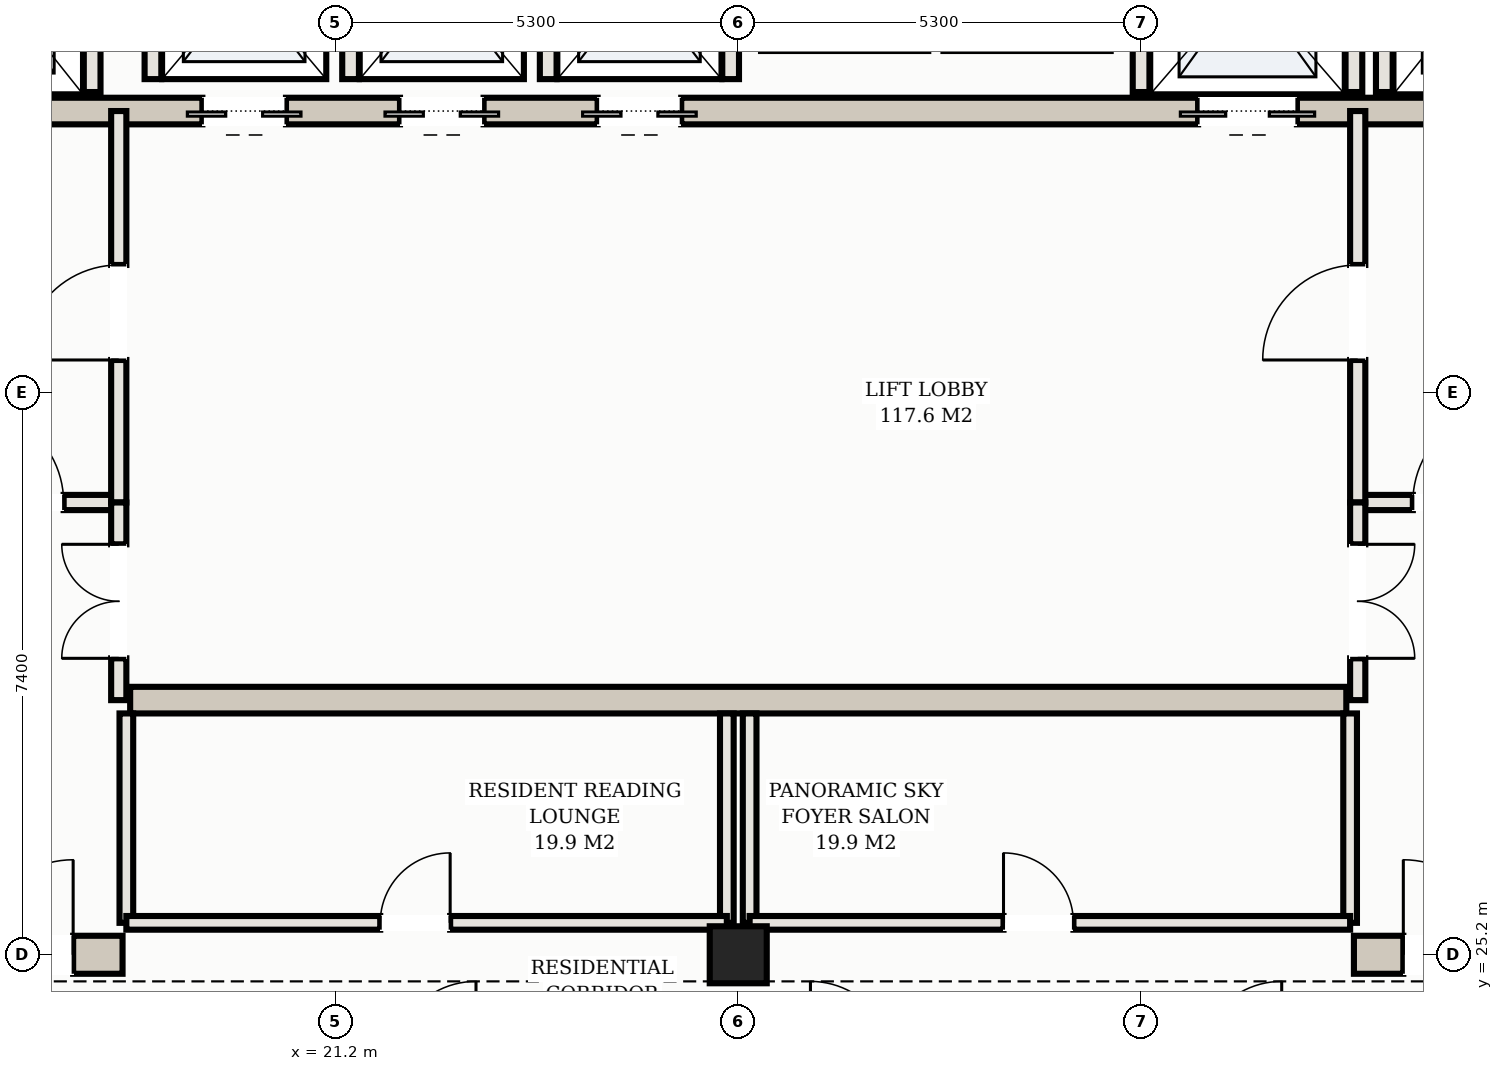
"""IFC4 building model, lengths in metres.
Left out: names, types, materials, properties, quantities, classifications, styles, units other than length and angle.
Written with IfcOpenShell. Run it as: python <this file> out.ifc"""

import sys

from ifc_helpers import new_model, si_unit, direction, frame, frame_2d, origin, origin_2d, place, context, subcontext, project, spatial, rectangle, hollow_rectangle, extrude, element, fill, save


model = new_model("IFC4")
c1 = context("Model", 3, precision=1e-05, world=origin(), true_north=direction((0.0, 1.0)))
c2 = subcontext(c1, "Body", "Model", "MODEL_VIEW")
j1 = project(units=[si_unit("LENGTHUNIT", "METRE"), si_unit("PLANEANGLEUNIT", "RADIAN")], contexts=[c1])
p1 = place(None, origin())
s1 = spatial("IfcSite", under=j1, at=p1, CompositionType="ELEMENT")
p2 = place(p1, origin())
s2 = spatial("IfcBuilding", under=s1, at=p2, CompositionType="ELEMENT")
p3 = place(p2, frame((0.0, 0.0, 236.3)))
s3 = spatial("IfcBuildingStorey", under=s2, at=p3, CompositionType="ELEMENT", Elevation=236.3)
p4 = place(p3, frame((10.35, 25.2, 0.0), z_axis=(0.0, 0.0, 1.0), x_axis=(1.0, 0.0, 0.0)))
e1 = element("IfcWall", 1, at=p4, inside=s3, PredefinedType="SHEAR", context=c2, shape_type="SweptSolid", body=[
    extrude(rectangle(XDim=8.05, YDim=0.5, at=frame_2d((4.025, 0.0))), origin(), (0.0, 0.0, 1.0), 3.11),
])
p5 = place(p4, frame((6.15, 0.0, 0.0)))
e2 = element("IfcOpeningElement", 2, at=p5, cuts=e1, PredefinedType="OPENING", context=c2, shape_type="SweptSolid", body=[
    extrude(rectangle(XDim=1.25, YDim=2.2, at=frame_2d((0.625, 1.1))), frame((0.0, 0.26, 0.0), z_axis=(0.0, -1.0, 0.0), x_axis=(1.0, 0.0, 0.0)), (0.0, 0.0, 1.0), 0.52),
])
p6 = place(p3, frame((34.6, 25.2, 0.0), z_axis=(0.0, 0.0, 1.0), x_axis=(1.0, 0.0, 0.0)))
e3 = element("IfcWall", 3, at=p6, inside=s3, PredefinedType="SHEAR", context=c2, shape_type="SweptSolid", body=[
    extrude(rectangle(XDim=8.05, YDim=0.5, at=frame_2d((4.025, 0.0))), origin(), (0.0, 0.0, 1.0), 3.11),
])
p7 = place(p6, frame((0.65, 0.0, 0.0)))
e4 = element("IfcOpeningElement", 4, at=p7, cuts=e3, PredefinedType="OPENING", context=c2, shape_type="SweptSolid", body=[
    extrude(rectangle(XDim=1.25, YDim=2.2, at=frame_2d((0.625, 1.1))), frame((0.0, 0.26, 0.0), z_axis=(0.0, -1.0, 0.0), x_axis=(1.0, 0.0, 0.0)), (0.0, 0.0, 1.0), 0.52),
])
p8 = place(p3, frame((15.5, 36.3, 0.0), z_axis=(0.0, 0.0, 1.0), x_axis=(1.0, 0.0, 0.0)))
e5 = element("IfcWall", 5, at=p8, inside=s3, PredefinedType="SHEAR", context=c2, shape_type="SweptSolid", body=[
    extrude(rectangle(XDim=22.0, YDim=0.35, at=frame_2d((11.0, 0.0))), origin(), (0.0, 0.0, 1.0), 3.11),
])
p9 = place(p8, frame((0.65, 0.0, 0.0)))
e6 = element("IfcOpeningElement", 6, at=p9, cuts=e5, PredefinedType="OPENING", context=c2, shape_type="SweptSolid", body=[
    extrude(rectangle(XDim=1.1, YDim=2.15, at=frame_2d((0.55, 1.075))), frame((0.0, 0.185, 0.0), z_axis=(0.0, -1.0, 0.0), x_axis=(1.0, 0.0, 0.0)), (0.0, 0.0, 1.0), 0.37),
])
p10 = place(p8, frame((20.25, 0.0, 0.0)))
e7 = element("IfcOpeningElement", 7, at=p10, cuts=e5, PredefinedType="OPENING", context=c2, shape_type="SweptSolid", body=[
    extrude(rectangle(XDim=1.1, YDim=2.15, at=frame_2d((0.55, 1.075))), frame((0.0, 0.185, 0.0), z_axis=(0.0, -1.0, 0.0), x_axis=(1.0, 0.0, 0.0)), (0.0, 0.0, 1.0), 0.37),
])
p11 = place(p8, frame((17.05, 0.0, 0.0)))
e8 = element("IfcOpeningElement", 8, at=p11, cuts=e5, PredefinedType="OPENING", context=c2, shape_type="SweptSolid", body=[
    extrude(rectangle(XDim=1.3, YDim=2.2, at=frame_2d((0.65, 1.1))), frame((0.0, 0.185, 0.0), z_axis=(0.0, -1.0, 0.0), x_axis=(1.0, 0.0, 0.0)), (0.0, 0.0, 1.0), 0.37),
])
p12 = place(p8, frame((3.95, 0.0, 0.0)))
e9 = element("IfcOpeningElement", 9, at=p12, cuts=e5, PredefinedType="OPENING", context=c2, shape_type="SweptSolid", body=[
    extrude(rectangle(XDim=1.1, YDim=2.15, at=frame_2d((0.55, 1.075))), frame((0.0, 0.185, 0.0), z_axis=(0.0, -1.0, 0.0), x_axis=(1.0, 0.0, 0.0)), (0.0, 0.0, 1.0), 0.37),
])
p13 = place(p8, frame((6.55, 0.0, 0.0)))
e10 = element("IfcOpeningElement", 10, at=p13, cuts=e5, PredefinedType="OPENING", context=c2, shape_type="SweptSolid", body=[
    extrude(rectangle(XDim=1.1, YDim=2.15, at=frame_2d((0.55, 1.075))), frame((0.0, 0.185, 0.0), z_axis=(0.0, -1.0, 0.0), x_axis=(1.0, 0.0, 0.0)), (0.0, 0.0, 1.0), 0.37),
])
p14 = place(p8, frame((9.15, 0.0, 0.0)))
e11 = element("IfcOpeningElement", 11, at=p14, cuts=e5, PredefinedType="OPENING", context=c2, shape_type="SweptSolid", body=[
    extrude(rectangle(XDim=1.1, YDim=2.15, at=frame_2d((0.55, 1.075))), frame((0.0, 0.185, 0.0), z_axis=(0.0, -1.0, 0.0), x_axis=(1.0, 0.0, 0.0)), (0.0, 0.0, 1.0), 0.37),
])
p15 = place(p3, frame((18.5, 28.55, 0.0), z_axis=(0.0, 0.0, 1.0), x_axis=(1.0, 0.0, 0.0)))
e12 = element("IfcWall", 12, at=p15, inside=s3, PredefinedType="SHEAR", context=c2, shape_type="SweptSolid", body=[
    extrude(rectangle(XDim=16.0, YDim=0.35, at=frame_2d((8.0, 0.0))), origin(), (0.0, 0.0, 1.0), 3.11),
])
p16 = place(p3, frame((26.5, 25.2, 0.0), z_axis=(0.0, 0.0, 1.0), x_axis=(1.0, 0.0, 0.0)))
e13 = element("IfcColumn", 13, at=p16, inside=s3, PredefinedType="COLUMN", context=c2, shape_type="SweptSolid", body=[
    extrude(hollow_rectangle(XDim=0.75, YDim=0.75, WallThickness=0.025, at=origin_2d()), origin(), (0.0, 0.0, 1.0), 3.3),
])
for number, where, z_axis, x_axis in (
    (14, (18.0, 36.55, 0.0), (0.0, 0.0, 1.0), (0.0, 1.0, 0.0)),
    (15, (35.0, 36.55, 0.0), (0.0, 0.0, 1.0), (0.0, 1.0, 0.0)),
    (16, (31.8, 36.55, 0.0), (0.0, 0.0, 1.0), (0.0, 1.0, 0.0)),
    (17, (34.6, 36.55, 0.0), (0.0, 0.0, 1.0), (0.0, 1.0, 0.0)),
):
    element("IfcWall", number, at=place(p3, frame(where, z_axis=z_axis, x_axis=x_axis)), inside=s3, PredefinedType="SOLIDWALL", context=c2, shape_type="SweptSolid", body=[
        extrude(rectangle(XDim=2.93, YDim=0.22, at=frame_2d((1.465, 0.0))), origin(), (0.0, 0.0, 1.0), 3.11),
    ])
for number, where, z_axis, x_axis in (
    (18, (18.8, 36.72, 0.0), (0.0, 0.0, 1.0), (0.0, 1.0, 0.0)),
    (19, (21.4, 36.72, 0.0), (0.0, 0.0, 1.0), (0.0, 1.0, 0.0)),
    (20, (24.0, 36.72, 0.0), (0.0, 0.0, 1.0), (0.0, 1.0, 0.0)),
    (21, (26.4, 36.72, 0.0), (0.0, 0.0, 1.0), (0.0, 1.0, 0.0)),
):
    element("IfcWall", number, at=place(p3, frame(where, z_axis=z_axis, x_axis=x_axis)), inside=s3, PredefinedType="SOLIDWALL", context=c2, shape_type="SweptSolid", body=[
        extrude(rectangle(XDim=2.56, YDim=0.22, at=frame_2d((1.28, 0.0))), origin(), (0.0, 0.0, 1.0), 3.11),
    ])
p17 = place(p3, frame((15.1, 31.15, 0.0), z_axis=(0.0, 0.0, 1.0), x_axis=(1.0, 0.0, 0.0)))
e22 = element("IfcWall", 22, at=p17, inside=s3, PredefinedType="PARTITIONING", context=c2, shape_type="SweptSolid", body=[
    extrude(rectangle(XDim=3.25, YDim=0.2, at=frame_2d((1.625, 0.0))), origin(), (0.0, 0.0, 1.0), 2.45),
])
p18 = place(p17, frame((1.275, 0.0, 0.0)))
e23 = element("IfcOpeningElement", 23, at=p18, cuts=e22, PredefinedType="OPENING", context=c2, shape_type="SweptSolid", body=[
    extrude(rectangle(XDim=1.25, YDim=2.2, at=frame_2d((0.625, 1.1))), frame((0.0, 0.11, 0.0), z_axis=(0.0, -1.0, 0.0), x_axis=(1.0, 0.0, 0.0)), (0.0, 0.0, 1.0), 0.22),
])
p19 = place(p3, frame((18.35, 31.15, 0.0), z_axis=(0.0, 0.0, 1.0), x_axis=(0.0, 1.0, 0.0)))
e24 = element("IfcWall", 24, at=p19, inside=s3, PredefinedType="PARTITIONING", context=c2, shape_type="SweptSolid", body=[
    extrude(rectangle(XDim=5.15, YDim=0.2, at=frame_2d((2.575, 0.0))), origin(), (0.0, 0.0, 1.0), 2.45),
])
p20 = place(p19, frame((1.875, 0.0, 0.0)))
e25 = element("IfcOpeningElement", 25, at=p20, cuts=e24, PredefinedType="OPENING", context=c2, shape_type="SweptSolid", body=[
    extrude(rectangle(XDim=1.25, YDim=2.2, at=frame_2d((0.625, 1.1))), frame((0.0, 0.11, 0.0), z_axis=(0.0, -1.0, 0.0), x_axis=(1.0, 0.0, 0.0)), (0.0, 0.0, 1.0), 0.22),
])
p21 = place(p3, frame((34.65, 31.15, 0.0), z_axis=(0.0, 0.0, 1.0), x_axis=(1.0, 0.0, 0.0)))
e26 = element("IfcWall", 26, at=p21, inside=s3, PredefinedType="PARTITIONING", context=c2, shape_type="SweptSolid", body=[
    extrude(rectangle(XDim=3.25, YDim=0.2, at=frame_2d((1.625, 0.0))), origin(), (0.0, 0.0, 1.0), 2.45),
])
p22 = place(p21, frame((0.725, 0.0, 0.0)))
e27 = element("IfcOpeningElement", 27, at=p22, cuts=e26, PredefinedType="OPENING", context=c2, shape_type="SweptSolid", body=[
    extrude(rectangle(XDim=1.25, YDim=2.2, at=frame_2d((0.625, 1.1))), frame((0.0, 0.11, 0.0), z_axis=(0.0, -1.0, 0.0), x_axis=(1.0, 0.0, 0.0)), (0.0, 0.0, 1.0), 0.22),
])
p23 = place(p3, frame((34.65, 31.15, 0.0), z_axis=(0.0, 0.0, 1.0), x_axis=(0.0, 1.0, 0.0)))
e28 = element("IfcWall", 28, at=p23, inside=s3, PredefinedType="PARTITIONING", context=c2, shape_type="SweptSolid", body=[
    extrude(rectangle(XDim=5.15, YDim=0.2, at=frame_2d((2.575, 0.0))), origin(), (0.0, 0.0, 1.0), 2.45),
])
p24 = place(p23, frame((1.875, 0.0, 0.0)))
e29 = element("IfcOpeningElement", 29, at=p24, cuts=e28, PredefinedType="OPENING", context=c2, shape_type="SweptSolid", body=[
    extrude(rectangle(XDim=1.25, YDim=2.2, at=frame_2d((0.625, 1.1))), frame((0.0, 0.11, 0.0), z_axis=(0.0, -1.0, 0.0), x_axis=(1.0, 0.0, 0.0)), (0.0, 0.0, 1.0), 0.22),
])
p25 = place(p3, frame((18.35, 28.55, 0.0), z_axis=(0.0, 0.0, 1.0), x_axis=(0.0, 1.0, 0.0)))
e30 = element("IfcWall", 30, at=p25, inside=s3, PredefinedType="PARTITIONING", context=c2, shape_type="SweptSolid", body=[
    extrude(rectangle(XDim=2.6, YDim=0.2, at=frame_2d((1.3, 0.0))), origin(), (0.0, 0.0, 1.0), 2.45),
])
p26 = place(p25, frame((0.55, 0.0, 0.0)))
e31 = element("IfcOpeningElement", 31, at=p26, cuts=e30, PredefinedType="OPENING", context=c2, shape_type="SweptSolid", body=[
    extrude(rectangle(XDim=1.5, YDim=2.25, at=frame_2d((0.75, 1.125))), frame((0.0, 0.11, 0.0), z_axis=(0.0, -1.0, 0.0), x_axis=(1.0, 0.0, 0.0)), (0.0, 0.0, 1.0), 0.22),
])
p27 = place(p3, frame((34.65, 28.55, 0.0), z_axis=(0.0, 0.0, 1.0), x_axis=(0.0, 1.0, 0.0)))
e32 = element("IfcWall", 32, at=p27, inside=s3, PredefinedType="PARTITIONING", context=c2, shape_type="SweptSolid", body=[
    extrude(rectangle(XDim=2.6, YDim=0.2, at=frame_2d((1.3, 0.0))), origin(), (0.0, 0.0, 1.0), 2.45),
])
p28 = place(p27, frame((0.55, 0.0, 0.0)))
e33 = element("IfcOpeningElement", 33, at=p28, cuts=e32, PredefinedType="OPENING", context=c2, shape_type="SweptSolid", body=[
    extrude(rectangle(XDim=1.5, YDim=2.25, at=frame_2d((0.75, 1.125))), frame((0.0, 0.11, 0.0), z_axis=(0.0, -1.0, 0.0), x_axis=(1.0, 0.0, 0.0)), (0.0, 0.0, 1.0), 0.22),
])
for number, where, z_axis, x_axis in (
    (34, (18.45, 25.62, 0.0), (0.0, 0.0, 1.0), (0.0, 1.0, 0.0)),
    (35, (26.35, 25.62, 0.0), (0.0, 0.0, 1.0), (0.0, 1.0, 0.0)),
):
    element("IfcWall", number, at=place(p3, frame(where, z_axis=z_axis, x_axis=x_axis)), inside=s3, PredefinedType="PARTITIONING", context=c2, shape_type="SweptSolid", body=[
        extrude(rectangle(XDim=2.755, YDim=0.18, at=frame_2d((1.377, 0.0))), origin(), (0.0, 0.0, 1.0), 2.45),
    ])
p29 = place(p3, frame((18.45, 25.62, 0.0), z_axis=(0.0, 0.0, 1.0), x_axis=(1.0, 0.0, 0.0)))
e36 = element("IfcWall", 36, at=p29, inside=s3, PredefinedType="PARTITIONING", context=c2, shape_type="SweptSolid", body=[
    extrude(rectangle(XDim=7.9, YDim=0.18, at=frame_2d((3.95, 0.0))), origin(), (0.0, 0.0, 1.0), 2.45),
])
p30 = place(p29, frame((3.34, 0.0, 0.0)))
e37 = element("IfcOpeningElement", 37, at=p30, cuts=e36, PredefinedType="OPENING", context=c2, shape_type="SweptSolid", body=[
    extrude(rectangle(XDim=0.92, YDim=2.15, at=frame_2d((0.46, 1.075))), frame((0.0, 0.1, 0.0), z_axis=(0.0, -1.0, 0.0), x_axis=(1.0, 0.0, 0.0)), (0.0, 0.0, 1.0), 0.2),
])
for number, where, z_axis, x_axis in (
    (38, (26.65, 25.62, 0.0), (0.0, 0.0, 1.0), (0.0, 1.0, 0.0)),
    (39, (34.55, 25.62, 0.0), (0.0, 0.0, 1.0), (0.0, 1.0, 0.0)),
):
    element("IfcWall", number, at=place(p3, frame(where, z_axis=z_axis, x_axis=x_axis)), inside=s3, PredefinedType="PARTITIONING", context=c2, shape_type="SweptSolid", body=[
        extrude(rectangle(XDim=2.755, YDim=0.18, at=frame_2d((1.377, 0.0))), origin(), (0.0, 0.0, 1.0), 2.45),
    ])
p31 = place(p3, frame((26.65, 25.62, 0.0), z_axis=(0.0, 0.0, 1.0), x_axis=(1.0, 0.0, 0.0)))
e40 = element("IfcWall", 40, at=p31, inside=s3, PredefinedType="PARTITIONING", context=c2, shape_type="SweptSolid", body=[
    extrude(rectangle(XDim=7.9, YDim=0.18, at=frame_2d((3.95, 0.0))), origin(), (0.0, 0.0, 1.0), 2.45),
])
p32 = place(p31, frame((3.34, 0.0, 0.0)))
e41 = element("IfcOpeningElement", 41, at=p32, cuts=e40, PredefinedType="OPENING", context=c2, shape_type="SweptSolid", body=[
    extrude(rectangle(XDim=0.92, YDim=2.15, at=frame_2d((0.46, 1.075))), frame((0.0, 0.1, 0.0), z_axis=(0.0, -1.0, 0.0), x_axis=(1.0, 0.0, 0.0)), (0.0, 0.0, 1.0), 0.2),
])
p33 = place(p11, frame((1.3, 0.0, 0.0), z_axis=(0.0, 0.0, 1.0), x_axis=(-1.0, 0.0, 0.0)))
e42 = element("IfcDoor", 42, at=p33, inside=s3, OperationType="DOUBLE_DOOR_SLIDING", PredefinedType="DOOR", context=c2, shape_type="SweptSolid", body=[
    extrude(rectangle(XDim=1.3, YDim=2.2, at=frame_2d((0.65, 1.1))), frame((0.0, 0.025, 0.0), z_axis=(0.0, -1.0, 0.0), x_axis=(1.0, 0.0, 0.0)), (0.0, 0.0, 1.0), 0.05),
])
fill(e8, e42)
p34 = place(p12, frame((1.1, 0.0, 0.0), z_axis=(0.0, 0.0, 1.0), x_axis=(-1.0, 0.0, 0.0)))
e43 = element("IfcDoor", 43, at=p34, inside=s3, OperationType="DOUBLE_DOOR_SLIDING", PredefinedType="DOOR", context=c2, shape_type="SweptSolid", body=[
    extrude(rectangle(XDim=1.1, YDim=2.15, at=frame_2d((0.55, 1.075))), frame((0.0, 0.025, 0.0), z_axis=(0.0, -1.0, 0.0), x_axis=(1.0, 0.0, 0.0)), (0.0, 0.0, 1.0), 0.05),
])
fill(e9, e43)
p35 = place(p13, frame((1.1, 0.0, 0.0), z_axis=(0.0, 0.0, 1.0), x_axis=(-1.0, 0.0, 0.0)))
e44 = element("IfcDoor", 44, at=p35, inside=s3, OperationType="DOUBLE_DOOR_SLIDING", PredefinedType="DOOR", context=c2, shape_type="SweptSolid", body=[
    extrude(rectangle(XDim=1.1, YDim=2.15, at=frame_2d((0.55, 1.075))), frame((0.0, 0.025, 0.0), z_axis=(0.0, -1.0, 0.0), x_axis=(1.0, 0.0, 0.0)), (0.0, 0.0, 1.0), 0.05),
])
fill(e10, e44)
p36 = place(p14, frame((1.1, 0.0, 0.0), z_axis=(0.0, 0.0, 1.0), x_axis=(-1.0, 0.0, 0.0)))
e45 = element("IfcDoor", 45, at=p36, inside=s3, OperationType="DOUBLE_DOOR_SLIDING", PredefinedType="DOOR", context=c2, shape_type="SweptSolid", body=[
    extrude(rectangle(XDim=1.1, YDim=2.15, at=frame_2d((0.55, 1.075))), frame((0.0, 0.025, 0.0), z_axis=(0.0, -1.0, 0.0), x_axis=(1.0, 0.0, 0.0)), (0.0, 0.0, 1.0), 0.05),
])
fill(e11, e45)
p37 = place(p5, origin())
e46 = element("IfcDoor", 46, at=p37, inside=s3, OperationType="SINGLE_SWING_RIGHT", PredefinedType="DOOR", context=c2, shape_type="SweptSolid", body=[
    extrude(rectangle(XDim=1.25, YDim=2.2, at=frame_2d((0.625, 1.1))), frame((0.0, 0.025, 0.0), z_axis=(0.0, -1.0, 0.0), x_axis=(1.0, 0.0, 0.0)), (0.0, 0.0, 1.0), 0.05),
])
fill(e2, e46)
p38 = place(p7, origin())
e47 = element("IfcDoor", 47, at=p38, inside=s3, OperationType="SINGLE_SWING_LEFT", PredefinedType="DOOR", context=c2, shape_type="SweptSolid", body=[
    extrude(rectangle(XDim=1.25, YDim=2.2, at=frame_2d((0.625, 1.1))), frame((0.0, 0.025, 0.0), z_axis=(0.0, -1.0, 0.0), x_axis=(1.0, 0.0, 0.0)), (0.0, 0.0, 1.0), 0.05),
])
fill(e4, e47)
p39 = place(p18, origin())
e48 = element("IfcDoor", 48, at=p39, inside=s3, OperationType="SINGLE_SWING_LEFT", PredefinedType="DOOR", context=c2, shape_type="SweptSolid", body=[
    extrude(rectangle(XDim=1.25, YDim=2.2, at=frame_2d((0.625, 1.1))), frame((0.0, 0.025, 0.0), z_axis=(0.0, -1.0, 0.0), x_axis=(1.0, 0.0, 0.0)), (0.0, 0.0, 1.0), 0.05),
])
fill(e23, e48)
p40 = place(p20, origin())
e49 = element("IfcDoor", 49, at=p40, inside=s3, OperationType="SINGLE_SWING_LEFT", PredefinedType="DOOR", context=c2, shape_type="SweptSolid", body=[
    extrude(rectangle(XDim=1.25, YDim=2.2, at=frame_2d((0.625, 1.1))), frame((0.0, 0.025, 0.0), z_axis=(0.0, -1.0, 0.0), x_axis=(1.0, 0.0, 0.0)), (0.0, 0.0, 1.0), 0.05),
])
fill(e25, e49)
p41 = place(p22, origin())
e50 = element("IfcDoor", 50, at=p41, inside=s3, OperationType="SINGLE_SWING_RIGHT", PredefinedType="DOOR", context=c2, shape_type="SweptSolid", body=[
    extrude(rectangle(XDim=1.25, YDim=2.2, at=frame_2d((0.625, 1.1))), frame((0.0, 0.025, 0.0), z_axis=(0.0, -1.0, 0.0), x_axis=(1.0, 0.0, 0.0)), (0.0, 0.0, 1.0), 0.05),
])
fill(e27, e50)
p42 = place(p24, origin())
e51 = element("IfcDoor", 51, at=p42, inside=s3, OperationType="SINGLE_SWING_LEFT", PredefinedType="DOOR", context=c2, shape_type="SweptSolid", body=[
    extrude(rectangle(XDim=1.25, YDim=2.2, at=frame_2d((0.625, 1.1))), frame((0.0, 0.025, 0.0), z_axis=(0.0, -1.0, 0.0), x_axis=(1.0, 0.0, 0.0)), (0.0, 0.0, 1.0), 0.05),
])
fill(e29, e51)
p43 = place(p26, origin())
e52 = element("IfcDoor", 52, at=p43, inside=s3, OperationType="DOUBLE_DOOR_SINGLE_SWING", PredefinedType="DOOR", context=c2, shape_type="SweptSolid", body=[
    extrude(rectangle(XDim=1.5, YDim=2.25, at=frame_2d((0.75, 1.125))), frame((0.0, 0.025, 0.0), z_axis=(0.0, -1.0, 0.0), x_axis=(1.0, 0.0, 0.0)), (0.0, 0.0, 1.0), 0.05),
])
fill(e31, e52)
p44 = place(p28, frame((1.5, 0.0, 0.0), z_axis=(0.0, 0.0, 1.0), x_axis=(-1.0, 0.0, 0.0)))
e53 = element("IfcDoor", 53, at=p44, inside=s3, OperationType="DOUBLE_DOOR_SINGLE_SWING", PredefinedType="DOOR", context=c2, shape_type="SweptSolid", body=[
    extrude(rectangle(XDim=1.5, YDim=2.25, at=frame_2d((0.75, 1.125))), frame((0.0, 0.025, 0.0), z_axis=(0.0, -1.0, 0.0), x_axis=(1.0, 0.0, 0.0)), (0.0, 0.0, 1.0), 0.05),
])
fill(e33, e53)
p45 = place(p30, origin())
e54 = element("IfcDoor", 54, at=p45, inside=s3, OperationType="SINGLE_SWING_RIGHT", PredefinedType="DOOR", context=c2, shape_type="SweptSolid", body=[
    extrude(rectangle(XDim=0.92, YDim=2.15, at=frame_2d((0.46, 1.075))), frame((0.0, 0.025, 0.0), z_axis=(0.0, -1.0, 0.0), x_axis=(1.0, 0.0, 0.0)), (0.0, 0.0, 1.0), 0.05),
])
fill(e37, e54)
p46 = place(p32, origin())
e55 = element("IfcDoor", 55, at=p46, inside=s3, OperationType="SINGLE_SWING_LEFT", PredefinedType="DOOR", context=c2, shape_type="SweptSolid", body=[
    extrude(rectangle(XDim=0.92, YDim=2.15, at=frame_2d((0.46, 1.075))), frame((0.0, 0.025, 0.0), z_axis=(0.0, -1.0, 0.0), x_axis=(1.0, 0.0, 0.0)), (0.0, 0.0, 1.0), 0.05),
])
fill(e41, e55)
save(model, sys.argv[1])
